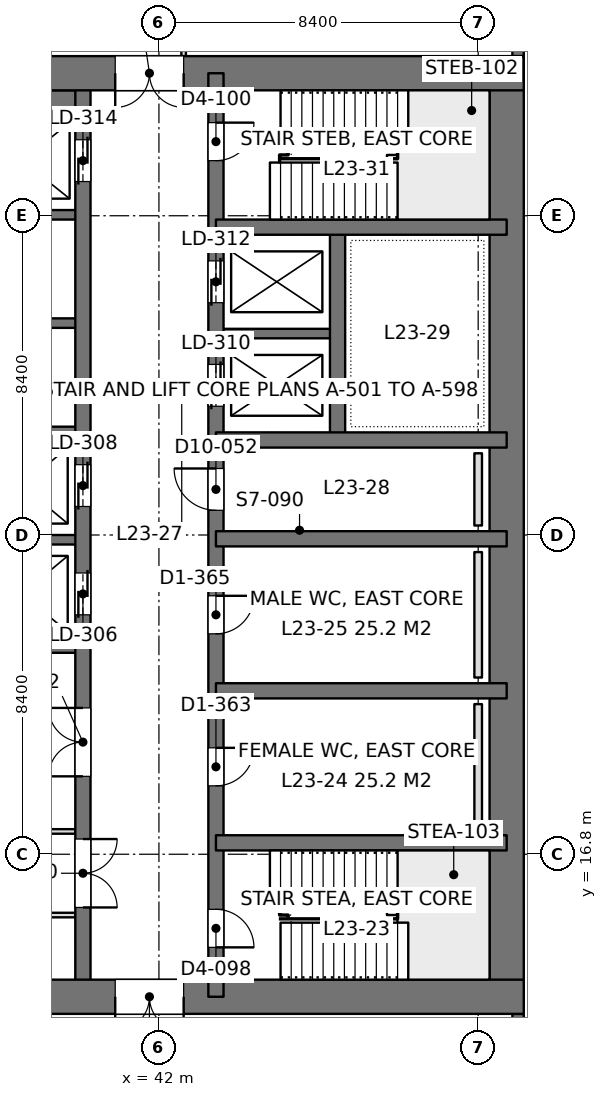
"""IFC4 building model, lengths in metres.
Left out: names, types, materials, properties, quantities, classifications, styles, units other than length and angle.
Written with IfcOpenShell. Run it as: python <this file> out.ifc"""

import sys

from ifc_helpers import new_model, si_unit, direction, frame, frame_2d, origin, place, context, subcontext, project, spatial, rectangle, extrude, element, fill, save


model = new_model("IFC4")
c1 = context("Model", 3, precision=1e-05, world=origin(), true_north=direction((0.0, 1.0)))
c2 = subcontext(c1, "Body", "Model", "MODEL_VIEW")
j1 = project(units=[si_unit("LENGTHUNIT", "METRE"), si_unit("PLANEANGLEUNIT", "RADIAN")], contexts=[c1])
p1 = place(None, origin())
s1 = spatial("IfcSite", under=j1, at=p1, CompositionType="ELEMENT")
p2 = place(p1, origin())
s2 = spatial("IfcBuilding", under=s1, at=p2, CompositionType="ELEMENT")
p3 = place(p2, frame((0.0, 0.0, 105.0)))
s3 = spatial("IfcBuildingStorey", under=s2, at=p3, CompositionType="ELEMENT", Elevation=105.0)
p4 = place(p3, frame((33.6, 13.05, 0.0), z_axis=(0.0, 0.0, 1.0), x_axis=(1.0, 0.0, 0.0)))
e1 = element("IfcWall", 1, at=p4, inside=s3, PredefinedType="SHEAR", context=c2, shape_type="SweptSolid", body=[
    extrude(rectangle(XDim=18.0, YDim=0.9, at=frame_2d((9.0, 0.0))), origin(), (0.0, 0.0, 1.0), 4.2),
])
p5 = place(p4, frame((7.25, 0.0, 0.0)))
e2 = element("IfcOpeningElement", 2, at=p5, cuts=e1, PredefinedType="OPENING", context=c2, shape_type="SweptSolid", body=[
    extrude(rectangle(XDim=1.8, YDim=2.4, at=frame_2d((0.9, 1.2))), frame((0.0, 0.46, 0.0), z_axis=(0.0, -1.0, 0.0), x_axis=(1.0, 0.0, 0.0)), (0.0, 0.0, 1.0), 0.92),
])
p6 = place(p3, frame((33.6, 37.35, 0.0), z_axis=(0.0, 0.0, 1.0), x_axis=(1.0, 0.0, 0.0)))
e3 = element("IfcWall", 3, at=p6, inside=s3, PredefinedType="SHEAR", context=c2, shape_type="SweptSolid", body=[
    extrude(rectangle(XDim=18.0, YDim=0.9, at=frame_2d((9.0, 0.0))), origin(), (0.0, 0.0, 1.0), 4.2),
])
p7 = place(p6, frame((7.25, 0.0, 0.0)))
e4 = element("IfcOpeningElement", 4, at=p7, cuts=e3, PredefinedType="OPENING", context=c2, shape_type="SweptSolid", body=[
    extrude(rectangle(XDim=1.8, YDim=2.4, at=frame_2d((0.9, 1.2))), frame((0.0, 0.46, 0.0), z_axis=(0.0, -1.0, 0.0), x_axis=(1.0, 0.0, 0.0)), (0.0, 0.0, 1.0), 0.92),
])
p8 = place(p3, frame((51.15, 13.05, 0.0), z_axis=(0.0, 0.0, 1.0), x_axis=(0.0, 1.0, 0.0)))
e5 = element("IfcWall", 5, at=p8, inside=s3, PredefinedType="SHEAR", context=c2, shape_type="SweptSolid", body=[
    extrude(rectangle(XDim=24.3, YDim=0.9, at=frame_2d((12.15, 0.0))), origin(), (0.0, 0.0, 1.0), 4.2),
])
p9 = place(p3, frame((43.5, 13.05, 0.0), z_axis=(0.0, 0.0, 1.0), x_axis=(0.0, 1.0, 0.0)))
e6 = element("IfcWall", 6, at=p9, inside=s3, PredefinedType="SHEAR", context=c2, shape_type="SweptSolid", body=[
    extrude(rectangle(XDim=24.3, YDim=0.4, at=frame_2d((12.15, 0.0))), origin(), (0.0, 0.0, 1.0), 4.2),
])
p10 = place(p9, frame((1.3, 0.0, 0.0)))
e7 = element("IfcOpeningElement", 7, at=p10, cuts=e6, PredefinedType="OPENING", context=c2, shape_type="SweptSolid", body=[
    extrude(rectangle(XDim=1.0, YDim=2.2, at=frame_2d((0.5, 1.1))), frame((0.0, 0.21, 0.0), z_axis=(0.0, -1.0, 0.0), x_axis=(1.0, 0.0, 0.0)), (0.0, 0.0, 1.0), 0.42),
])
p11 = place(p9, frame((22.0, 0.0, 0.0)))
e8 = element("IfcOpeningElement", 8, at=p11, cuts=e6, PredefinedType="OPENING", context=c2, shape_type="SweptSolid", body=[
    extrude(rectangle(XDim=1.0, YDim=2.2, at=frame_2d((0.5, 1.1))), frame((0.0, 0.21, 0.0), z_axis=(0.0, -1.0, 0.0), x_axis=(1.0, 0.0, 0.0)), (0.0, 0.0, 1.0), 0.42),
])
p12 = place(p9, frame((5.55, 0.0, 0.0)))
e9 = element("IfcOpeningElement", 9, at=p12, cuts=e6, PredefinedType="OPENING", context=c2, shape_type="SweptSolid", body=[
    extrude(rectangle(XDim=1.0, YDim=2.2, at=frame_2d((0.5, 1.1))), frame((0.0, 0.21, 0.0), z_axis=(0.0, -1.0, 0.0), x_axis=(1.0, 0.0, 0.0)), (0.0, 0.0, 1.0), 0.42),
])
p13 = place(p9, frame((9.55, 0.0, 0.0)))
e10 = element("IfcOpeningElement", 10, at=p13, cuts=e6, PredefinedType="OPENING", context=c2, shape_type="SweptSolid", body=[
    extrude(rectangle(XDim=1.0, YDim=2.2, at=frame_2d((0.5, 1.1))), frame((0.0, 0.21, 0.0), z_axis=(0.0, -1.0, 0.0), x_axis=(1.0, 0.0, 0.0)), (0.0, 0.0, 1.0), 0.42),
])
p14 = place(p9, frame((12.8, 0.0, 0.0)))
e11 = element("IfcOpeningElement", 11, at=p14, cuts=e6, PredefinedType="OPENING", context=c2, shape_type="SweptSolid", body=[
    extrude(rectangle(XDim=1.1, YDim=2.2, at=frame_2d((0.55, 1.1))), frame((0.0, 0.21, 0.0), z_axis=(0.0, -1.0, 0.0), x_axis=(1.0, 0.0, 0.0)), (0.0, 0.0, 1.0), 0.42),
])
p15 = place(p9, frame((15.538, 0.0, 0.0)))
e12 = element("IfcOpeningElement", 12, at=p15, cuts=e6, PredefinedType="OPENING", context=c2, shape_type="SweptSolid", body=[
    extrude(rectangle(XDim=1.1, YDim=2.2, at=frame_2d((0.55, 1.1))), frame((0.0, 0.21, 0.0), z_axis=(0.0, -1.0, 0.0), x_axis=(1.0, 0.0, 0.0)), (0.0, 0.0, 1.0), 0.42),
])
p16 = place(p9, frame((18.262, 0.0, 0.0)))
e13 = element("IfcOpeningElement", 13, at=p16, cuts=e6, PredefinedType="OPENING", context=c2, shape_type="SweptSolid", body=[
    extrude(rectangle(XDim=1.1, YDim=2.2, at=frame_2d((0.55, 1.1))), frame((0.0, 0.21, 0.0), z_axis=(0.0, -1.0, 0.0), x_axis=(1.0, 0.0, 0.0)), (0.0, 0.0, 1.0), 0.42),
])
p17 = place(p3, frame((40.0, 13.05, 0.0), z_axis=(0.0, 0.0, 1.0), x_axis=(0.0, 1.0, 0.0)))
e14 = element("IfcWall", 14, at=p17, inside=s3, PredefinedType="SHEAR", context=c2, shape_type="SweptSolid", body=[
    extrude(rectangle(XDim=24.3, YDim=0.4, at=frame_2d((12.15, 0.0))), origin(), (0.0, 0.0, 1.0), 4.2),
])
p18 = place(p17, frame((10.05, 0.0, 0.0)))
e15 = element("IfcOpeningElement", 15, at=p18, cuts=e14, PredefinedType="OPENING", context=c2, shape_type="SweptSolid", body=[
    extrude(rectangle(XDim=1.1, YDim=2.2, at=frame_2d((0.55, 1.1))), frame((0.0, 0.21, 0.0), z_axis=(0.0, -1.0, 0.0), x_axis=(1.0, 0.0, 0.0)), (0.0, 0.0, 1.0), 0.42),
])
p19 = place(p17, frame((12.9, 0.0, 0.0)))
e16 = element("IfcOpeningElement", 16, at=p19, cuts=e14, PredefinedType="OPENING", context=c2, shape_type="SweptSolid", body=[
    extrude(rectangle(XDim=1.1, YDim=2.2, at=frame_2d((0.55, 1.1))), frame((0.0, 0.21, 0.0), z_axis=(0.0, -1.0, 0.0), x_axis=(1.0, 0.0, 0.0)), (0.0, 0.0, 1.0), 0.42),
])
p20 = place(p17, frame((21.45, 0.0, 0.0)))
e17 = element("IfcOpeningElement", 17, at=p20, cuts=e14, PredefinedType="OPENING", context=c2, shape_type="SweptSolid", body=[
    extrude(rectangle(XDim=1.1, YDim=2.2, at=frame_2d((0.55, 1.1))), frame((0.0, 0.21, 0.0), z_axis=(0.0, -1.0, 0.0), x_axis=(1.0, 0.0, 0.0)), (0.0, 0.0, 1.0), 0.42),
])
p21 = place(p17, frame((2.35, 0.0, 0.0)))
e18 = element("IfcOpeningElement", 18, at=p21, cuts=e14, PredefinedType="OPENING", context=c2, shape_type="SweptSolid", body=[
    extrude(rectangle(XDim=1.8, YDim=2.4, at=frame_2d((0.9, 1.2))), frame((0.0, 0.21, 0.0), z_axis=(0.0, -1.0, 0.0), x_axis=(1.0, 0.0, 0.0)), (0.0, 0.0, 1.0), 0.42),
])
p22 = place(p17, frame((5.8, 0.0, 0.0)))
e19 = element("IfcOpeningElement", 19, at=p22, cuts=e14, PredefinedType="OPENING", context=c2, shape_type="SweptSolid", body=[
    extrude(rectangle(XDim=1.8, YDim=2.4, at=frame_2d((0.9, 1.2))), frame((0.0, 0.21, 0.0), z_axis=(0.0, -1.0, 0.0), x_axis=(1.0, 0.0, 0.0)), (0.0, 0.0, 1.0), 0.42),
])
for number, where, z_axis, x_axis in (
    (20, (51.15, 17.1, 0.0), (0.0, 0.0, 1.0), (-1.0, 0.0, 0.0)),
    (21, (51.15, 21.1, 0.0), (0.0, 0.0, 1.0), (-1.0, 0.0, 0.0)),
    (22, (51.15, 25.1, 0.0), (0.0, 0.0, 1.0), (-1.0, 0.0, 0.0)),
    (23, (51.15, 27.7, 0.0), (0.0, 0.0, 1.0), (-1.0, 0.0, 0.0)),
    (24, (51.15, 33.3, 0.0), (0.0, 0.0, 1.0), (-1.0, 0.0, 0.0)),
):
    element("IfcWall", number, at=place(p3, frame(where, z_axis=z_axis, x_axis=x_axis)), inside=s3, PredefinedType="SHEAR", context=c2, shape_type="SweptSolid", body=[
        extrude(rectangle(XDim=7.65, YDim=0.4, at=frame_2d((3.825, 0.0))), origin(), (0.0, 0.0, 1.0), 4.2),
    ])
p23 = place(p3, frame((46.7, 27.7, 0.0), z_axis=(0.0, 0.0, 1.0), x_axis=(0.0, 1.0, 0.0)))
e25 = element("IfcWall", 25, at=p23, inside=s3, PredefinedType="SHEAR", context=c2, shape_type="SweptSolid", body=[
    extrude(rectangle(XDim=5.6, YDim=0.4, at=frame_2d((2.8, 0.0))), origin(), (0.0, 0.0, 1.0), 4.2),
])
p24 = place(p3, frame((46.7, 30.5, 0.0), z_axis=(0.0, 0.0, 1.0), x_axis=(-1.0, 0.0, 0.0)))
e26 = element("IfcWall", 26, at=p24, inside=s3, PredefinedType="SHEAR", context=c2, shape_type="SweptSolid", body=[
    extrude(rectangle(XDim=3.2, YDim=0.25, at=frame_2d((1.6, 0.0))), origin(), (0.0, 0.0, 1.0), 4.2),
])
p25 = place(p3, frame((40.0, 22.225, 0.0), z_axis=(0.0, 0.0, 1.0), x_axis=(-1.0, 0.0, 0.0)))
e27 = element("IfcWall", 27, at=p25, inside=s3, PredefinedType="SHEAR", context=c2, shape_type="SweptSolid", body=[
    extrude(rectangle(XDim=5.95, YDim=0.25, at=frame_2d((2.975, 0.0))), origin(), (0.0, 0.0, 1.0), 4.2),
])
for number, where, z_axis, x_axis in (
    (28, (40.0, 25.075, 0.0), (0.0, 0.0, 1.0), (-1.0, 0.0, 0.0)),
    (29, (40.0, 27.925, 0.0), (0.0, 0.0, 1.0), (-1.0, 0.0, 0.0)),
    (30, (40.0, 30.775, 0.0), (0.0, 0.0, 1.0), (-1.0, 0.0, 0.0)),
    (31, (40.0, 33.625, 0.0), (0.0, 0.0, 1.0), (-1.0, 0.0, 0.0)),
):
    element("IfcWall", number, at=place(p3, frame(where, z_axis=z_axis, x_axis=x_axis)), inside=s3, PredefinedType="SHEAR", context=c2, shape_type="SweptSolid", body=[
        extrude(rectangle(XDim=3.2, YDim=0.25, at=frame_2d((1.6, 0.0))), origin(), (0.0, 0.0, 1.0), 4.2),
    ])
p26 = place(p3, frame((40.0, 36.625, 0.0), z_axis=(0.0, 0.0, 1.0), x_axis=(-1.0, 0.0, 0.0)))
e32 = element("IfcWall", 32, at=p26, inside=s3, PredefinedType="SHEAR", context=c2, shape_type="SweptSolid", body=[
    extrude(rectangle(XDim=3.2, YDim=0.55, at=frame_2d((1.6, 0.0))), origin(), (0.0, 0.0, 1.0), 4.2),
])
p27 = place(p3, frame((51.45, 42.0, 0.0), z_axis=(0.0, 0.0, 1.0), x_axis=(0.0, -1.0, 0.0)))
e33 = element("IfcWall", 33, at=p27, inside=s3, PredefinedType="SOLIDWALL", context=c2, shape_type="SweptSolid", body=[
    extrude(rectangle(XDim=4.2, YDim=0.3, at=frame_2d((2.1, 0.0))), origin(), (0.0, 0.0, 1.0), 4.05),
])
p28 = place(p27, frame((0.9, 0.0, 0.9)))
e34 = element("IfcOpeningElement", 34, at=p28, cuts=e33, PredefinedType="OPENING", context=c2, shape_type="SweptSolid", body=[
    extrude(rectangle(XDim=2.4, YDim=1.9, at=frame_2d((1.2, 0.95))), frame((0.0, 0.16, 0.0), z_axis=(0.0, -1.0, 0.0), x_axis=(1.0, 0.0, 0.0)), (0.0, 0.0, 1.0), 0.32),
])
p29 = place(p3, frame((51.45, 12.6, 0.0), z_axis=(0.0, 0.0, 1.0), x_axis=(0.0, -1.0, 0.0)))
e35 = element("IfcWall", 35, at=p29, inside=s3, PredefinedType="SOLIDWALL", context=c2, shape_type="SweptSolid", body=[
    extrude(rectangle(XDim=4.2, YDim=0.3, at=frame_2d((2.1, 0.0))), origin(), (0.0, 0.0, 1.0), 4.05),
])
p30 = place(p29, frame((0.9, 0.0, 0.9)))
e36 = element("IfcOpeningElement", 36, at=p30, cuts=e35, PredefinedType="OPENING", context=c2, shape_type="SweptSolid", body=[
    extrude(rectangle(XDim=2.4, YDim=1.9, at=frame_2d((1.2, 0.95))), frame((0.0, 0.16, 0.0), z_axis=(0.0, -1.0, 0.0), x_axis=(1.0, 0.0, 0.0)), (0.0, 0.0, 1.0), 0.32),
])
p31 = place(p3, frame((33.898, 17.4, 0.0), z_axis=(0.0, 0.0, 1.0), x_axis=(1.0, 0.0, 0.0)))
e37 = element("IfcWall", 37, at=p31, inside=s3, PredefinedType="PARTITIONING", context=c2, shape_type="SweptSolid", body=[
    extrude(rectangle(XDim=5.904, YDim=0.12, at=frame_2d((2.952, 0.0))), origin(), (0.0, 0.0, 1.0), 3.55),
])
p32 = place(p31, frame((0.38, 0.0, 0.0)))
e38 = element("IfcOpeningElement", 38, at=p32, cuts=e37, PredefinedType="OPENING", context=c2, shape_type="SweptSolid", body=[
    extrude(rectangle(XDim=1.0, YDim=2.4, at=frame_2d((0.5, 1.2))), frame((0.0, 0.07, 0.0), z_axis=(0.0, -1.0, 0.0), x_axis=(1.0, 0.0, 0.0)), (0.0, 0.0, 1.0), 0.14),
])
p33 = place(p3, frame((33.598, 15.2, 0.0), z_axis=(0.0, 0.0, 1.0), x_axis=(1.0, 0.0, 0.0)))
e39 = element("IfcWall", 39, at=p33, inside=s3, PredefinedType="PARTITIONING", context=c2, shape_type="SweptSolid", body=[
    extrude(rectangle(XDim=6.204, YDim=0.12, at=frame_2d((3.102, 0.0))), origin(), (0.0, 0.0, 1.0), 3.55),
])
p34 = place(p3, frame((42.65, 37.8, 0.0), z_axis=(0.0, 0.0, 1.0), x_axis=(0.0, 1.0, 0.0)))
e40 = element("IfcWall", 40, at=p34, inside=s3, PredefinedType="PARTITIONING", context=c2, shape_type="SweptSolid", body=[
    extrude(rectangle(XDim=2.0, YDim=0.12, at=frame_2d((1.0, 0.0))), origin(), (0.0, 0.0, 1.0), 4.05),
])
for number, where, z_axis, x_axis in (
    (41, (50.4, 17.45, 0.0), (0.0, 0.0, 1.0), (0.0, 1.0, 0.0)),
    (42, (50.4, 21.45, 0.0), (0.0, 0.0, 1.0), (0.0, 1.0, 0.0)),
):
    element("IfcWall", number, at=place(p3, frame(where, z_axis=z_axis, x_axis=x_axis)), inside=s3, PredefinedType="PLUMBINGWALL", context=c2, shape_type="SweptSolid", body=[
        extrude(rectangle(XDim=3.3, YDim=0.2, at=frame_2d((1.65, 0.0))), origin(), (0.0, 0.0, 1.0), 1.2),
    ])
p35 = place(p3, frame((50.4, 25.45, 0.0), z_axis=(0.0, 0.0, 1.0), x_axis=(0.0, 1.0, 0.0)))
e43 = element("IfcWall", 43, at=p35, inside=s3, PredefinedType="PLUMBINGWALL", context=c2, shape_type="SweptSolid", body=[
    extrude(rectangle(XDim=1.9, YDim=0.2, at=frame_2d((0.95, 0.0))), origin(), (0.0, 0.0, 1.0), 1.2),
])
p36 = place(p5, frame((1.8, 0.0, 0.0), z_axis=(0.0, 0.0, 1.0), x_axis=(-1.0, 0.0, 0.0)))
e44 = element("IfcDoor", 44, at=p36, inside=s3, OperationType="DOUBLE_DOOR_SINGLE_SWING", PredefinedType="DOOR", context=c2, shape_type="SweptSolid", body=[
    extrude(rectangle(XDim=1.8, YDim=2.4, at=frame_2d((0.9, 1.2))), frame((0.0, 0.025, 0.0), z_axis=(0.0, -1.0, 0.0), x_axis=(1.0, 0.0, 0.0)), (0.0, 0.0, 1.0), 0.05),
])
fill(e2, e44)
p37 = place(p7, frame((1.8, 0.0, 0.0), z_axis=(0.0, 0.0, 1.0), x_axis=(-1.0, 0.0, 0.0)))
e45 = element("IfcDoor", 45, at=p37, inside=s3, OperationType="DOUBLE_DOOR_SINGLE_SWING", PredefinedType="DOOR", context=c2, shape_type="SweptSolid", body=[
    extrude(rectangle(XDim=1.8, YDim=2.4, at=frame_2d((0.9, 1.2))), frame((0.0, 0.025, 0.0), z_axis=(0.0, -1.0, 0.0), x_axis=(1.0, 0.0, 0.0)), (0.0, 0.0, 1.0), 0.05),
])
fill(e4, e45)
p38 = place(p10, frame((1.0, 0.0, 0.0), z_axis=(0.0, 0.0, 1.0), x_axis=(-1.0, 0.0, 0.0)))
e46 = element("IfcDoor", 46, at=p38, inside=s3, OperationType="SINGLE_SWING_RIGHT", PredefinedType="DOOR", context=c2, shape_type="SweptSolid", body=[
    extrude(rectangle(XDim=1.0, YDim=2.2, at=frame_2d((0.5, 1.1))), frame((0.0, 0.025, 0.0), z_axis=(0.0, -1.0, 0.0), x_axis=(1.0, 0.0, 0.0)), (0.0, 0.0, 1.0), 0.05),
])
fill(e7, e46)
p39 = place(p11, frame((1.0, 0.0, 0.0), z_axis=(0.0, 0.0, 1.0), x_axis=(-1.0, 0.0, 0.0)))
e47 = element("IfcDoor", 47, at=p39, inside=s3, OperationType="SINGLE_SWING_LEFT", PredefinedType="DOOR", context=c2, shape_type="SweptSolid", body=[
    extrude(rectangle(XDim=1.0, YDim=2.2, at=frame_2d((0.5, 1.1))), frame((0.0, 0.025, 0.0), z_axis=(0.0, -1.0, 0.0), x_axis=(1.0, 0.0, 0.0)), (0.0, 0.0, 1.0), 0.05),
])
fill(e8, e47)
p40 = place(p12, frame((1.0, 0.0, 0.0), z_axis=(0.0, 0.0, 1.0), x_axis=(-1.0, 0.0, 0.0)))
e48 = element("IfcDoor", 48, at=p40, inside=s3, OperationType="SINGLE_SWING_LEFT", PredefinedType="DOOR", context=c2, shape_type="SweptSolid", body=[
    extrude(rectangle(XDim=1.0, YDim=2.2, at=frame_2d((0.5, 1.1))), frame((0.0, 0.025, 0.0), z_axis=(0.0, -1.0, 0.0), x_axis=(1.0, 0.0, 0.0)), (0.0, 0.0, 1.0), 0.05),
])
fill(e9, e48)
p41 = place(p13, frame((1.0, 0.0, 0.0), z_axis=(0.0, 0.0, 1.0), x_axis=(-1.0, 0.0, 0.0)))
e49 = element("IfcDoor", 49, at=p41, inside=s3, OperationType="SINGLE_SWING_LEFT", PredefinedType="DOOR", context=c2, shape_type="SweptSolid", body=[
    extrude(rectangle(XDim=1.0, YDim=2.2, at=frame_2d((0.5, 1.1))), frame((0.0, 0.025, 0.0), z_axis=(0.0, -1.0, 0.0), x_axis=(1.0, 0.0, 0.0)), (0.0, 0.0, 1.0), 0.05),
])
fill(e10, e49)
p42 = place(p14, origin())
e50 = element("IfcDoor", 50, at=p42, inside=s3, OperationType="SINGLE_SWING_RIGHT", PredefinedType="DOOR", context=c2, shape_type="SweptSolid", body=[
    extrude(rectangle(XDim=1.1, YDim=2.2, at=frame_2d((0.55, 1.1))), frame((0.0, 0.025, 0.0), z_axis=(0.0, -1.0, 0.0), x_axis=(1.0, 0.0, 0.0)), (0.0, 0.0, 1.0), 0.05),
])
fill(e11, e50)
p43 = place(p18, origin())
e51 = element("IfcDoor", 51, at=p43, inside=s3, OperationType="DOUBLE_DOOR_SLIDING", PredefinedType="DOOR", context=c2, shape_type="SweptSolid", body=[
    extrude(rectangle(XDim=1.1, YDim=2.2, at=frame_2d((0.55, 1.1))), frame((0.0, 0.025, 0.0), z_axis=(0.0, -1.0, 0.0), x_axis=(1.0, 0.0, 0.0)), (0.0, 0.0, 1.0), 0.05),
])
fill(e15, e51)
p44 = place(p19, origin())
e52 = element("IfcDoor", 52, at=p44, inside=s3, OperationType="DOUBLE_DOOR_SLIDING", PredefinedType="DOOR", context=c2, shape_type="SweptSolid", body=[
    extrude(rectangle(XDim=1.1, YDim=2.2, at=frame_2d((0.55, 1.1))), frame((0.0, 0.025, 0.0), z_axis=(0.0, -1.0, 0.0), x_axis=(1.0, 0.0, 0.0)), (0.0, 0.0, 1.0), 0.05),
])
fill(e16, e52)
p45 = place(p20, origin())
e53 = element("IfcDoor", 53, at=p45, inside=s3, OperationType="DOUBLE_DOOR_SLIDING", PredefinedType="DOOR", context=c2, shape_type="SweptSolid", body=[
    extrude(rectangle(XDim=1.1, YDim=2.2, at=frame_2d((0.55, 1.1))), frame((0.0, 0.025, 0.0), z_axis=(0.0, -1.0, 0.0), x_axis=(1.0, 0.0, 0.0)), (0.0, 0.0, 1.0), 0.05),
])
fill(e17, e53)
p46 = place(p15, origin())
e54 = element("IfcDoor", 54, at=p46, inside=s3, OperationType="DOUBLE_DOOR_SLIDING", PredefinedType="DOOR", context=c2, shape_type="SweptSolid", body=[
    extrude(rectangle(XDim=1.1, YDim=2.2, at=frame_2d((0.55, 1.1))), frame((0.0, 0.025, 0.0), z_axis=(0.0, -1.0, 0.0), x_axis=(1.0, 0.0, 0.0)), (0.0, 0.0, 1.0), 0.05),
])
fill(e12, e54)
p47 = place(p16, origin())
e55 = element("IfcDoor", 55, at=p47, inside=s3, OperationType="DOUBLE_DOOR_SLIDING", PredefinedType="DOOR", context=c2, shape_type="SweptSolid", body=[
    extrude(rectangle(XDim=1.1, YDim=2.2, at=frame_2d((0.55, 1.1))), frame((0.0, 0.025, 0.0), z_axis=(0.0, -1.0, 0.0), x_axis=(1.0, 0.0, 0.0)), (0.0, 0.0, 1.0), 0.05),
])
fill(e13, e55)
p48 = place(p21, frame((1.8, 0.0, 0.0), z_axis=(0.0, 0.0, 1.0), x_axis=(-1.0, 0.0, 0.0)))
e56 = element("IfcDoor", 56, at=p48, inside=s3, OperationType="DOUBLE_DOOR_SINGLE_SWING", PredefinedType="DOOR", context=c2, shape_type="SweptSolid", body=[
    extrude(rectangle(XDim=1.8, YDim=2.4, at=frame_2d((0.9, 1.2))), frame((0.0, 0.025, 0.0), z_axis=(0.0, -1.0, 0.0), x_axis=(1.0, 0.0, 0.0)), (0.0, 0.0, 1.0), 0.05),
])
fill(e18, e56)
p49 = place(p22, origin())
e57 = element("IfcDoor", 57, at=p49, inside=s3, OperationType="DOUBLE_DOOR_SINGLE_SWING", PredefinedType="DOOR", context=c2, shape_type="SweptSolid", body=[
    extrude(rectangle(XDim=1.8, YDim=2.4, at=frame_2d((0.9, 1.2))), frame((0.0, 0.025, 0.0), z_axis=(0.0, -1.0, 0.0), x_axis=(1.0, 0.0, 0.0)), (0.0, 0.0, 1.0), 0.05),
])
fill(e19, e57)
save(model, sys.argv[1])
